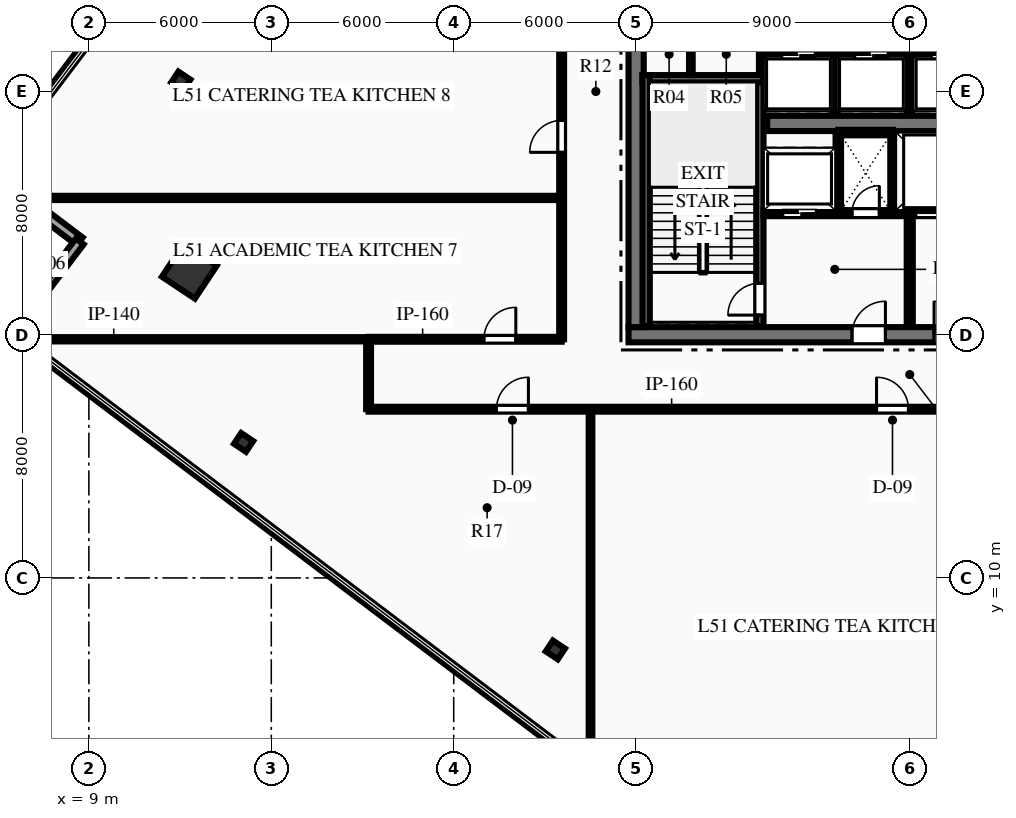
"""IFC4 building model, lengths in metres.
Left out: names, types, materials, properties, quantities, classifications, styles, units other than length and angle.
Written with IfcOpenShell. Run it as: python <this file> out.ifc"""

import sys

from ifc_helpers import new_model, si_unit, direction, frame, frame_2d, origin, origin_2d, place, context, subcontext, project, spatial, rectangle, hollow_rectangle, i_section, extrude, element, fill, save


model = new_model("IFC4")
c1 = context("Model", 3, precision=1e-05, world=origin(), true_north=direction((0.0, 1.0)))
c2 = subcontext(c1, "Body", "Model", "MODEL_VIEW")
j1 = project(units=[si_unit("LENGTHUNIT", "METRE"), si_unit("PLANEANGLEUNIT", "RADIAN")], contexts=[c1])
p1 = place(None, origin())
s1 = spatial("IfcSite", under=j1, at=p1, CompositionType="ELEMENT")
p2 = place(p1, origin())
s2 = spatial("IfcBuilding", under=s1, at=p2, CompositionType="ELEMENT")
p3 = place(p2, frame((0.0, 0.0, 205.95)))
s3 = spatial("IfcBuildingStorey", under=s2, at=p3, CompositionType="ELEMENT", Elevation=205.95)
p4 = place(p3, frame((26.75, 18.0, 0.0), z_axis=(0.0, 0.0, 1.0), x_axis=(1.0, 0.0, 0.0)))
e1 = element("IfcWall", 1, at=p4, inside=s3, PredefinedType="SHEAR", context=c2, shape_type="SweptSolid", body=[
    extrude(rectangle(XDim=18.5, YDim=0.5, at=frame_2d((9.25, 0.0))), origin(), (0.0, 0.0, 1.0), 3.75),
])
p5 = place(p4, frame((7.35, 0.0, 0.0)))
e2 = element("IfcOpeningElement", 2, at=p5, cuts=e1, PredefinedType="OPENING", context=c2, shape_type="SweptSolid", body=[
    extrude(rectangle(XDim=1.1, YDim=2.15, at=frame_2d((0.55, 1.075))), frame((0.0, 0.26, 0.0), z_axis=(0.0, -1.0, 0.0), x_axis=(1.0, 0.0, 0.0)), (0.0, 0.0, 1.0), 0.52),
])
p6 = place(p4, frame((10.05, 0.0, 0.0)))
e3 = element("IfcOpeningElement", 3, at=p6, cuts=e1, PredefinedType="OPENING", context=c2, shape_type="SweptSolid", body=[
    extrude(rectangle(XDim=1.1, YDim=2.15, at=frame_2d((0.55, 1.075))), frame((0.0, 0.26, 0.0), z_axis=(0.0, -1.0, 0.0), x_axis=(1.0, 0.0, 0.0)), (0.0, 0.0, 1.0), 0.52),
])
p7 = place(p3, frame((27.0, 18.25, 0.0), z_axis=(0.0, 0.0, 1.0), x_axis=(0.0, 1.0, 0.0)))
e4 = element("IfcWall", 4, at=p7, inside=s3, PredefinedType="SHEAR", context=c2, shape_type="SweptSolid", body=[
    extrude(rectangle(XDim=15.5, YDim=0.5, at=frame_2d((7.75, 0.0))), origin(), (0.0, 0.0, 1.0), 3.75),
])
p8 = place(p7, frame((9.99, 0.0, 0.0)))
e5 = element("IfcOpeningElement", 5, at=p8, cuts=e4, PredefinedType="OPENING", context=c2, shape_type="SweptSolid", body=[
    extrude(rectangle(XDim=1.4, YDim=2.2, at=frame_2d((0.7, 1.1))), frame((0.0, 0.26, 0.0), z_axis=(0.0, -1.0, 0.0), x_axis=(1.0, 0.0, 0.0)), (0.0, 0.0, 1.0), 0.52),
])
p9 = place(p3, frame((31.31, 24.95, 0.0), z_axis=(0.0, 0.0, 1.0), x_axis=(1.0, 0.0, 0.0)))
e6 = element("IfcWall", 6, at=p9, inside=s3, PredefinedType="SHEAR", context=c2, shape_type="SweptSolid", body=[
    extrude(rectangle(XDim=9.38, YDim=0.5, at=frame_2d((4.69, 0.0))), origin(), (0.0, 0.0, 1.0), 3.75),
])
p10 = place(p3, frame((31.07, 18.28, 0.0), z_axis=(0.0, 0.0, 1.0), x_axis=(0.0, 1.0, 0.0)))
e7 = element("IfcWall", 7, at=p10, inside=s3, PredefinedType="SHEAR", context=c2, shape_type="SweptSolid", body=[
    extrude(rectangle(XDim=8.26, YDim=0.24, at=frame_2d((4.13, 0.0))), origin(), (0.0, 0.0, 1.0), 3.75),
])
p11 = place(p10, frame((0.365, 0.0, 0.0)))
e8 = element("IfcOpeningElement", 8, at=p11, cuts=e7, PredefinedType="OPENING", context=c2, shape_type="SweptSolid", body=[
    extrude(rectangle(XDim=1.05, YDim=2.15, at=frame_2d((0.525, 1.075))), frame((0.0, 0.13, 0.0), z_axis=(0.0, -1.0, 0.0), x_axis=(1.0, 0.0, 0.0)), (0.0, 0.0, 1.0), 0.26),
])
p12 = place(p3, frame((27.21, 26.42, 0.0), z_axis=(0.0, 0.0, 1.0), x_axis=(1.0, 0.0, 0.0)))
e9 = element("IfcWall", 9, at=p12, inside=s3, PredefinedType="SHEAR", context=c2, shape_type="SweptSolid", body=[
    extrude(rectangle(XDim=3.98, YDim=0.24, at=frame_2d((1.99, 0.0))), origin(), (0.0, 0.0, 1.0), 3.75),
])
p13 = place(p3, frame((27.33, 18.28, 0.0), z_axis=(0.0, 0.0, 1.0), x_axis=(0.0, 1.0, 0.0)))
e10 = element("IfcWall", 10, at=p13, inside=s3, PredefinedType="SHEAR", context=c2, shape_type="SweptSolid", body=[
    extrude(rectangle(XDim=8.26, YDim=0.24, at=frame_2d((4.13, 0.0))), origin(), (0.0, 0.0, 1.0), 3.75),
])
p14 = place(p3, frame((12.305, 20.09, 0.0), z_axis=(0.0, 0.0, 1.0), x_axis=(0.554118199338, 0.832437998389, 0.0)))
e11 = element("IfcColumn", 11, at=p14, inside=s3, PredefinedType="COLUMN", context=c2, shape_type="SweptSolid", body=[
    extrude(hollow_rectangle(XDim=1.3, YDim=1.3, WallThickness=0.06, at=origin_2d()), origin(), (0.0, 0.0, 1.0), 3.75),
])
for number, where, z_axis, x_axis in (
    (12, (12.025, 26.347, 0.0), (0.0, 0.0, 1.0), (0.554, 0.832, 0.0)),
    (13, (14.088, 14.458, 0.0), (0.0, 0.0, 1.0), (0.554, 0.832, 0.0)),
    (14, (24.343, 7.631, 0.0), (0.0, 0.0, 1.0), (0.554, 0.832, 0.0)),
):
    element("IfcColumn", number, at=place(p3, frame(where, z_axis=z_axis, x_axis=x_axis)), inside=s3, PredefinedType="COLUMN", context=c2, shape_type="SweptSolid", body=[
        extrude(i_section(OverallWidth=0.424, OverallDepth=0.474, WebThickness=0.048, FlangeThickness=0.077, at=origin_2d()), origin(), (0.0, 0.0, 1.0), 3.75),
    ])
p15 = place(p3, frame((8.7, 21.07, 0.0), z_axis=(0.0, 0.0, 1.0), x_axis=(-0.797582200659, 0.603210272784, 0.0)))
e15 = element("IfcWall", 15, at=p15, inside=s3, PredefinedType="STANDARD", context=c2, shape_type="SweptSolid", body=[
    extrude(rectangle(XDim=3.9, YDim=0.32, at=frame_2d((1.95, 0.0))), origin(), (0.0, 0.0, 1.0), 3.47),
])
p16 = place(p3, frame((6.347, 17.959, 0.0), z_axis=(0.0, 0.0, 1.0), x_axis=(0.603210272784, 0.797582200659, 0.0)))
e16 = element("IfcWall", 16, at=p16, inside=s3, PredefinedType="STANDARD", context=c2, shape_type="SweptSolid", body=[
    extrude(rectangle(XDim=3.9, YDim=0.32, at=frame_2d((1.95, 0.0))), origin(), (0.0, 0.0, 1.0), 3.47),
])
p17 = place(p16, frame((1.25, 0.0, 0.85)))
e17 = element("IfcOpeningElement", 17, at=p17, cuts=e16, PredefinedType="OPENING", context=c2, shape_type="SweptSolid", body=[
    extrude(rectangle(XDim=1.4, YDim=2.0, at=frame_2d((0.7, 1.0))), frame((0.0, 0.17, 0.0), z_axis=(0.0, -1.0, 0.0), x_axis=(1.0, 0.0, 0.0)), (0.0, 0.0, 1.0), 0.34),
])
p18 = place(p3, frame((36.0, 18.28, 0.0), z_axis=(0.0, 0.0, 1.0), x_axis=(0.0, 1.0, 0.0)))
e18 = element("IfcWall", 18, at=p18, inside=s3, PredefinedType="PARTITIONING", context=c2, shape_type="SweptSolid", body=[
    extrude(rectangle(XDim=3.77, YDim=0.2, at=frame_2d((1.885, 0.0))), origin(), (0.0, 0.0, 1.0), 3.47),
])
p19 = place(p3, frame((31.19, 22.0, 0.0), z_axis=(0.0, 0.0, 1.0), x_axis=(1.0, 0.0, 0.0)))
e19 = element("IfcWall", 19, at=p19, inside=s3, PredefinedType="PARTITIONING", context=c2, shape_type="SweptSolid", body=[
    extrude(rectangle(XDim=4.69, YDim=0.2, at=frame_2d((2.345, 0.0))), origin(), (0.0, 0.0, 1.0), 3.47),
])
p20 = place(p19, frame((2.91, 0.0, 0.0)))
e20 = element("IfcOpeningElement", 20, at=p20, cuts=e19, PredefinedType="OPENING", context=c2, shape_type="SweptSolid", body=[
    extrude(rectangle(XDim=0.9, YDim=2.15, at=frame_2d((0.45, 1.075))), frame((0.0, 0.11, 0.0), z_axis=(0.0, -1.0, 0.0), x_axis=(1.0, 0.0, 0.0)), (0.0, 0.0, 1.0), 0.22),
])
p21 = place(p19, frame((0.635, 0.0, 0.0)))
e21 = element("IfcOpeningElement", 21, at=p21, cuts=e19, PredefinedType="OPENING", context=c2, shape_type="SweptSolid", body=[
    extrude(rectangle(XDim=1.1, YDim=2.15, at=frame_2d((0.55, 1.075))), frame((0.0, 0.11, 0.0), z_axis=(0.0, -1.0, 0.0), x_axis=(1.0, 0.0, 0.0)), (0.0, 0.0, 1.0), 0.22),
])
p22 = place(p3, frame((36.12, 22.0, 0.0), z_axis=(0.0, 0.0, 1.0), x_axis=(1.0, 0.0, 0.0)))
e22 = element("IfcWall", 22, at=p22, inside=s3, PredefinedType="PARTITIONING", context=c2, shape_type="SweptSolid", body=[
    extrude(rectangle(XDim=4.69, YDim=0.2, at=frame_2d((2.345, 0.0))), origin(), (0.0, 0.0, 1.0), 3.47),
])
p23 = place(p22, frame((2.955, 0.0, 0.0)))
e23 = element("IfcOpeningElement", 23, at=p23, cuts=e22, PredefinedType="OPENING", context=c2, shape_type="SweptSolid", body=[
    extrude(rectangle(XDim=1.1, YDim=2.15, at=frame_2d((0.55, 1.075))), frame((0.0, 0.11, 0.0), z_axis=(0.0, -1.0, 0.0), x_axis=(1.0, 0.0, 0.0)), (0.0, 0.0, 1.0), 0.22),
])
p24 = place(p22, frame((0.08, 0.0, 0.0)))
e24 = element("IfcOpeningElement", 24, at=p24, cuts=e22, PredefinedType="OPENING", context=c2, shape_type="SweptSolid", body=[
    extrude(rectangle(XDim=1.4, YDim=2.2, at=frame_2d((0.7, 1.1))), frame((0.0, 0.11, 0.0), z_axis=(0.0, -1.0, 0.0), x_axis=(1.0, 0.0, 0.0)), (0.0, 0.0, 1.0), 0.22),
])
for number, where, z_axis, x_axis in (
    (25, (33.65, 22.05, 0.0), (0.0, 0.0, 1.0), (0.0, 1.0, 0.0)),
    (26, (35.45, 22.05, 0.0), (0.0, 0.0, 1.0), (0.0, 1.0, 0.0)),
):
    element("IfcWall", number, at=place(p3, frame(where, z_axis=z_axis, x_axis=x_axis)), inside=s3, PredefinedType="PARTITIONING", context=c2, shape_type="SweptSolid", body=[
        extrude(rectangle(XDim=2.6, YDim=0.18, at=frame_2d((1.3, 0.0))), origin(), (0.0, 0.0, 1.0), 3.47),
    ])
p25 = place(p3, frame((33.65, 24.65, 0.0), z_axis=(0.0, 0.0, 1.0), x_axis=(1.0, 0.0, 0.0)))
e27 = element("IfcWall", 27, at=p25, inside=s3, PredefinedType="PARTITIONING", context=c2, shape_type="SweptSolid", body=[
    extrude(rectangle(XDim=1.8, YDim=0.18, at=frame_2d((0.9, 0.0))), origin(), (0.0, 0.0, 1.0), 3.47),
])
p26 = place(p3, frame((31.12, 26.54, 0.0), z_axis=(0.0, 0.0, 1.0), x_axis=(0.0, 1.0, 0.0)))
e28 = element("IfcWall", 28, at=p26, inside=s3, PredefinedType="PARTITIONING", context=c2, shape_type="SweptSolid", body=[
    extrude(rectangle(XDim=1.51, YDim=0.16, at=frame_2d((0.755, 0.0))), origin(), (0.0, 0.0, 1.0), 3.47),
])
p27 = place(p3, frame((28.8, 26.54, 0.0), z_axis=(0.0, 0.0, 1.0), x_axis=(0.0, 1.0, 0.0)))
e29 = element("IfcWall", 29, at=p27, inside=s3, PredefinedType="PARTITIONING", context=c2, shape_type="SweptSolid", body=[
    extrude(rectangle(XDim=1.44, YDim=0.12, at=frame_2d((0.72, 0.0))), origin(), (0.0, 0.0, 1.0), 3.47),
])
p28 = place(p3, frame((31.2, 27.2, 0.0), z_axis=(0.0, 0.0, 1.0), x_axis=(1.0, 0.0, 0.0)))
e30 = element("IfcWall", 30, at=p28, inside=s3, PredefinedType="PARTITIONING", context=c2, shape_type="SweptSolid", body=[
    extrude(rectangle(XDim=9.6, YDim=0.18, at=frame_2d((4.8, 0.0))), origin(), (0.0, 0.0, 1.0), 3.47),
])
p29 = place(p28, frame((0.59, 0.0, 0.0)))
e31 = element("IfcOpeningElement", 31, at=p29, cuts=e30, PredefinedType="OPENING", context=c2, shape_type="SweptSolid", body=[
    extrude(rectangle(XDim=1.1, YDim=2.15, at=frame_2d((0.55, 1.075))), frame((0.0, 0.1, 0.0), z_axis=(0.0, -1.0, 0.0), x_axis=(1.0, 0.0, 0.0)), (0.0, 0.0, 1.0), 0.2),
])
p30 = place(p28, frame((2.99, 0.0, 0.0)))
e32 = element("IfcOpeningElement", 32, at=p30, cuts=e30, PredefinedType="OPENING", context=c2, shape_type="SweptSolid", body=[
    extrude(rectangle(XDim=1.1, YDim=2.15, at=frame_2d((0.55, 1.075))), frame((0.0, 0.1, 0.0), z_axis=(0.0, -1.0, 0.0), x_axis=(1.0, 0.0, 0.0)), (0.0, 0.0, 1.0), 0.2),
])
p31 = place(p28, frame((5.51, 0.0, 0.0)))
e33 = element("IfcOpeningElement", 33, at=p31, cuts=e30, PredefinedType="OPENING", context=c2, shape_type="SweptSolid", body=[
    extrude(rectangle(XDim=1.1, YDim=2.15, at=frame_2d((0.55, 1.075))), frame((0.0, 0.1, 0.0), z_axis=(0.0, -1.0, 0.0), x_axis=(1.0, 0.0, 0.0)), (0.0, 0.0, 1.0), 0.2),
])
p32 = place(p28, frame((7.91, 0.0, 0.0)))
e34 = element("IfcOpeningElement", 34, at=p32, cuts=e30, PredefinedType="OPENING", context=c2, shape_type="SweptSolid", body=[
    extrude(rectangle(XDim=1.1, YDim=2.15, at=frame_2d((0.55, 1.075))), frame((0.0, 0.1, 0.0), z_axis=(0.0, -1.0, 0.0), x_axis=(1.0, 0.0, 0.0)), (0.0, 0.0, 1.0), 0.2),
])
for number, where, z_axis, x_axis in (
    (35, (33.54, 25.3, 0.0), (0.0, 0.0, 1.0), (0.0, 1.0, 0.0)),
    (36, (36.0, 25.3, 0.0), (0.0, 0.0, 1.0), (0.0, 1.0, 0.0)),
):
    element("IfcWall", number, at=place(p3, frame(where, z_axis=z_axis, x_axis=x_axis)), inside=s3, PredefinedType="PARTITIONING", context=c2, shape_type="SweptSolid", body=[
        extrude(rectangle(XDim=1.9, YDim=0.18, at=frame_2d((0.95, 0.0))), origin(), (0.0, 0.0, 1.0), 3.47),
    ])
p33 = place(p3, frame((18.2, 15.55, 0.0), z_axis=(0.0, 0.0, 1.0), x_axis=(1.0, 0.0, 0.0)))
e37 = element("IfcWall", 37, at=p33, inside=s3, PredefinedType="PARTITIONING", context=c2, shape_type="SweptSolid", body=[
    extrude(rectangle(XDim=35.6, YDim=0.16, at=frame_2d((17.8, 0.0))), origin(), (0.0, 0.0, 1.0), 2.849),
])
p34 = place(p33, frame((22.45, 0.0, 0.0)))
e38 = element("IfcOpeningElement", 38, at=p34, cuts=e37, PredefinedType="OPENING", context=c2, shape_type="SweptSolid", body=[
    extrude(rectangle(XDim=0.9, YDim=2.15, at=frame_2d((0.45, 1.075))), frame((0.0, 0.09, 0.0), z_axis=(0.0, -1.0, 0.0), x_axis=(1.0, 0.0, 0.0)), (0.0, 0.0, 1.0), 0.18),
])
p35 = place(p33, frame((24.75, 0.0, 0.0)))
e39 = element("IfcOpeningElement", 39, at=p35, cuts=e37, PredefinedType="OPENING", context=c2, shape_type="SweptSolid", body=[
    extrude(rectangle(XDim=0.9, YDim=2.15, at=frame_2d((0.45, 1.075))), frame((0.0, 0.09, 0.0), z_axis=(0.0, -1.0, 0.0), x_axis=(1.0, 0.0, 0.0)), (0.0, 0.0, 1.0), 0.18),
])
p36 = place(p33, frame((27.0, 0.0, 0.0)))
e40 = element("IfcOpeningElement", 40, at=p36, cuts=e37, PredefinedType="OPENING", context=c2, shape_type="SweptSolid", body=[
    extrude(rectangle(XDim=1.0, YDim=2.15, at=frame_2d((0.5, 1.075))), frame((0.0, 0.09, 0.0), z_axis=(0.0, -1.0, 0.0), x_axis=(1.0, 0.0, 0.0)), (0.0, 0.0, 1.0), 0.18),
])
p37 = place(p33, frame((4.207, 0.0, 0.0)))
e41 = element("IfcOpeningElement", 41, at=p37, cuts=e37, PredefinedType="OPENING", context=c2, shape_type="SweptSolid", body=[
    extrude(rectangle(XDim=1.05, YDim=2.15, at=frame_2d((0.525, 1.075))), frame((0.0, 0.09, 0.0), z_axis=(0.0, -1.0, 0.0), x_axis=(1.0, 0.0, 0.0)), (0.0, 0.0, 1.0), 0.18),
])
p38 = place(p33, frame((16.707, 0.0, 0.0)))
e42 = element("IfcOpeningElement", 42, at=p38, cuts=e37, PredefinedType="OPENING", context=c2, shape_type="SweptSolid", body=[
    extrude(rectangle(XDim=1.05, YDim=2.15, at=frame_2d((0.525, 1.075))), frame((0.0, 0.09, 0.0), z_axis=(0.0, -1.0, 0.0), x_axis=(1.0, 0.0, 0.0)), (0.0, 0.0, 1.0), 0.18),
])
p39 = place(p3, frame((18.2, 17.85, 0.0), z_axis=(0.0, 0.0, 1.0), x_axis=(1.0, 0.0, 0.0)))
e43 = element("IfcWall", 43, at=p39, inside=s3, PredefinedType="PARTITIONING", context=c2, shape_type="SweptSolid", body=[
    extrude(rectangle(XDim=6.35, YDim=0.16, at=frame_2d((3.175, 0.0))), origin(), (0.0, 0.0, 1.0), 3.47),
])
p40 = place(p39, frame((3.793, 0.0, 0.0)))
e44 = element("IfcOpeningElement", 44, at=p40, cuts=e43, PredefinedType="OPENING", context=c2, shape_type="SweptSolid", body=[
    extrude(rectangle(XDim=1.05, YDim=2.15, at=frame_2d((0.525, 1.075))), frame((0.0, 0.09, 0.0), z_axis=(0.0, -1.0, 0.0), x_axis=(1.0, 0.0, 0.0)), (0.0, 0.0, 1.0), 0.18),
])
p41 = place(p3, frame((24.55, 17.85, 0.0), z_axis=(0.0, 0.0, 1.0), x_axis=(0.0, 1.0, 0.0)))
e45 = element("IfcWall", 45, at=p41, inside=s3, PredefinedType="PARTITIONING", context=c2, shape_type="SweptSolid", body=[
    extrude(rectangle(XDim=16.3, YDim=0.16, at=frame_2d((8.15, 0.0))), origin(), (0.0, 0.0, 1.0), 3.47),
])
p42 = place(p41, frame((6.149, 0.0, 0.0)))
e46 = element("IfcOpeningElement", 46, at=p42, cuts=e45, PredefinedType="OPENING", context=c2, shape_type="SweptSolid", body=[
    extrude(rectangle(XDim=1.05, YDim=2.15, at=frame_2d((0.525, 1.075))), frame((0.0, 0.09, 0.0), z_axis=(0.0, -1.0, 0.0), x_axis=(1.0, 0.0, 0.0)), (0.0, 0.0, 1.0), 0.18),
])
p43 = place(p3, frame((18.2, 15.55, 0.0), z_axis=(0.0, 0.0, 1.0), x_axis=(0.0, 1.0, 0.0)))
e47 = element("IfcWall", 47, at=p43, inside=s3, PredefinedType="PARTITIONING", context=c2, shape_type="SweptSolid", body=[
    extrude(rectangle(XDim=2.3, YDim=0.16, at=frame_2d((1.15, 0.0))), origin(), (0.0, 0.0, 1.0), 3.47),
])
p44 = place(p3, frame((6.558, 17.85, 0.0), z_axis=(0.0, 0.0, 1.0), x_axis=(1.0, 0.0, 0.0)))
e48 = element("IfcWall", 48, at=p44, inside=s3, PredefinedType="PARTITIONING", context=c2, shape_type="SweptSolid", body=[
    extrude(rectangle(XDim=11.642, YDim=0.14, at=frame_2d((5.821, 0.0))), origin(), (0.0, 0.0, 1.0), 3.47),
])
p45 = place(p3, frame((25.5, 3.524, 0.0), z_axis=(0.0, 0.0, 1.0), x_axis=(0.0, 1.0, 0.0)))
e49 = element("IfcWall", 49, at=p45, inside=s3, PredefinedType="PARTITIONING", context=c2, shape_type="SweptSolid", body=[
    extrude(rectangle(XDim=12.026, YDim=0.12, at=frame_2d((6.013, 0.0))), origin(), (0.0, 0.0, 1.0), 2.849),
])
p46 = place(p3, frame((6.875, 22.5, 0.0), z_axis=(0.0, 0.0, 1.0), x_axis=(1.0, 0.0, 0.0)))
e50 = element("IfcWall", 50, at=p46, inside=s3, PredefinedType="PARTITIONING", context=c2, shape_type="SweptSolid", body=[
    extrude(rectangle(XDim=17.675, YDim=0.14, at=frame_2d((8.837, 0.0))), origin(), (0.0, 0.0, 1.0), 3.47),
])
p47 = place(p17, origin())
e51 = element("IfcWindow", 51, at=p47, inside=s3, PartitioningType="SINGLE_PANEL", PredefinedType="WINDOW", context=c2, shape_type="SweptSolid", body=[
    extrude(rectangle(XDim=1.4, YDim=2.0, at=frame_2d((0.7, 1.0))), frame((0.0, 0.03, 0.0), z_axis=(0.0, -1.0, 0.0), x_axis=(1.0, 0.0, 0.0)), (0.0, 0.0, 1.0), 0.06),
])
fill(e17, e51)
p48 = place(p11, origin())
e52 = element("IfcDoor", 52, at=p48, inside=s3, OperationType="SINGLE_SWING_LEFT", PredefinedType="DOOR", context=c2, shape_type="SweptSolid", body=[
    extrude(rectangle(XDim=1.05, YDim=2.15, at=frame_2d((0.525, 1.075))), frame((0.0, 0.025, 0.0), z_axis=(0.0, -1.0, 0.0), x_axis=(1.0, 0.0, 0.0)), (0.0, 0.0, 1.0), 0.05),
])
fill(e8, e52)
p49 = place(p5, origin())
e53 = element("IfcDoor", 53, at=p49, inside=s3, OperationType="SINGLE_SWING_RIGHT", PredefinedType="DOOR", context=c2, shape_type="SweptSolid", body=[
    extrude(rectangle(XDim=1.1, YDim=2.15, at=frame_2d((0.55, 1.075))), frame((0.0, 0.025, 0.0), z_axis=(0.0, -1.0, 0.0), x_axis=(1.0, 0.0, 0.0)), (0.0, 0.0, 1.0), 0.05),
])
fill(e2, e53)
p50 = place(p6, origin())
e54 = element("IfcDoor", 54, at=p50, inside=s3, OperationType="SINGLE_SWING_LEFT", PredefinedType="DOOR", context=c2, shape_type="SweptSolid", body=[
    extrude(rectangle(XDim=1.1, YDim=2.15, at=frame_2d((0.55, 1.075))), frame((0.0, 0.025, 0.0), z_axis=(0.0, -1.0, 0.0), x_axis=(1.0, 0.0, 0.0)), (0.0, 0.0, 1.0), 0.05),
])
fill(e3, e54)
p51 = place(p20, origin())
e55 = element("IfcDoor", 55, at=p51, inside=s3, OperationType="SINGLE_SWING_RIGHT", PredefinedType="DOOR", context=c2, shape_type="SweptSolid", body=[
    extrude(rectangle(XDim=0.9, YDim=2.15, at=frame_2d((0.45, 1.075))), frame((0.0, 0.025, 0.0), z_axis=(0.0, -1.0, 0.0), x_axis=(1.0, 0.0, 0.0)), (0.0, 0.0, 1.0), 0.05),
])
fill(e20, e55)
p52 = place(p37, origin())
e56 = element("IfcDoor", 56, at=p52, inside=s3, OperationType="SINGLE_SWING_RIGHT", PredefinedType="DOOR", context=c2, shape_type="SweptSolid", body=[
    extrude(rectangle(XDim=1.05, YDim=2.15, at=frame_2d((0.525, 1.075))), frame((0.0, 0.025, 0.0), z_axis=(0.0, -1.0, 0.0), x_axis=(1.0, 0.0, 0.0)), (0.0, 0.0, 1.0), 0.05),
])
fill(e41, e56)
p53 = place(p38, origin())
e57 = element("IfcDoor", 57, at=p53, inside=s3, OperationType="SINGLE_SWING_LEFT", PredefinedType="DOOR", context=c2, shape_type="SweptSolid", body=[
    extrude(rectangle(XDim=1.05, YDim=2.15, at=frame_2d((0.525, 1.075))), frame((0.0, 0.025, 0.0), z_axis=(0.0, -1.0, 0.0), x_axis=(1.0, 0.0, 0.0)), (0.0, 0.0, 1.0), 0.05),
])
fill(e42, e57)
p54 = place(p40, origin())
e58 = element("IfcDoor", 58, at=p54, inside=s3, OperationType="SINGLE_SWING_RIGHT", PredefinedType="DOOR", context=c2, shape_type="SweptSolid", body=[
    extrude(rectangle(XDim=1.05, YDim=2.15, at=frame_2d((0.525, 1.075))), frame((0.0, 0.025, 0.0), z_axis=(0.0, -1.0, 0.0), x_axis=(1.0, 0.0, 0.0)), (0.0, 0.0, 1.0), 0.05),
])
fill(e44, e58)
p55 = place(p42, origin())
e59 = element("IfcDoor", 59, at=p55, inside=s3, OperationType="SINGLE_SWING_LEFT", PredefinedType="DOOR", context=c2, shape_type="SweptSolid", body=[
    extrude(rectangle(XDim=1.05, YDim=2.15, at=frame_2d((0.525, 1.075))), frame((0.0, 0.025, 0.0), z_axis=(0.0, -1.0, 0.0), x_axis=(1.0, 0.0, 0.0)), (0.0, 0.0, 1.0), 0.05),
])
fill(e46, e59)
p56 = place(p29, origin())
e60 = element("IfcDoor", 60, at=p56, inside=s3, OperationType="SLIDING_TO_LEFT", PredefinedType="DOOR", context=c2, shape_type="SweptSolid", body=[
    extrude(rectangle(XDim=1.1, YDim=2.15, at=frame_2d((0.55, 1.075))), frame((0.0, 0.025, 0.0), z_axis=(0.0, -1.0, 0.0), x_axis=(1.0, 0.0, 0.0)), (0.0, 0.0, 1.0), 0.05),
])
fill(e31, e60)
p57 = place(p30, origin())
e61 = element("IfcDoor", 61, at=p57, inside=s3, OperationType="SLIDING_TO_LEFT", PredefinedType="DOOR", context=c2, shape_type="SweptSolid", body=[
    extrude(rectangle(XDim=1.1, YDim=2.15, at=frame_2d((0.55, 1.075))), frame((0.0, 0.025, 0.0), z_axis=(0.0, -1.0, 0.0), x_axis=(1.0, 0.0, 0.0)), (0.0, 0.0, 1.0), 0.05),
])
fill(e32, e61)
p58 = place(p31, origin())
e62 = element("IfcDoor", 62, at=p58, inside=s3, OperationType="SLIDING_TO_LEFT", PredefinedType="DOOR", context=c2, shape_type="SweptSolid", body=[
    extrude(rectangle(XDim=1.1, YDim=2.15, at=frame_2d((0.55, 1.075))), frame((0.0, 0.025, 0.0), z_axis=(0.0, -1.0, 0.0), x_axis=(1.0, 0.0, 0.0)), (0.0, 0.0, 1.0), 0.05),
])
fill(e33, e62)
p59 = place(p21, origin())
e63 = element("IfcDoor", 63, at=p59, inside=s3, OperationType="SLIDING_TO_LEFT", PredefinedType="DOOR", context=c2, shape_type="SweptSolid", body=[
    extrude(rectangle(XDim=1.1, YDim=2.15, at=frame_2d((0.55, 1.075))), frame((0.0, 0.025, 0.0), z_axis=(0.0, -1.0, 0.0), x_axis=(1.0, 0.0, 0.0)), (0.0, 0.0, 1.0), 0.05),
])
fill(e21, e63)
p60 = place(p24, origin())
e64 = element("IfcDoor", 64, at=p60, inside=s3, OperationType="SLIDING_TO_LEFT", PredefinedType="DOOR", context=c2, shape_type="SweptSolid", body=[
    extrude(rectangle(XDim=1.4, YDim=2.2, at=frame_2d((0.7, 1.1))), frame((0.0, 0.025, 0.0), z_axis=(0.0, -1.0, 0.0), x_axis=(1.0, 0.0, 0.0)), (0.0, 0.0, 1.0), 0.05),
])
fill(e24, e64)
save(model, sys.argv[1])
